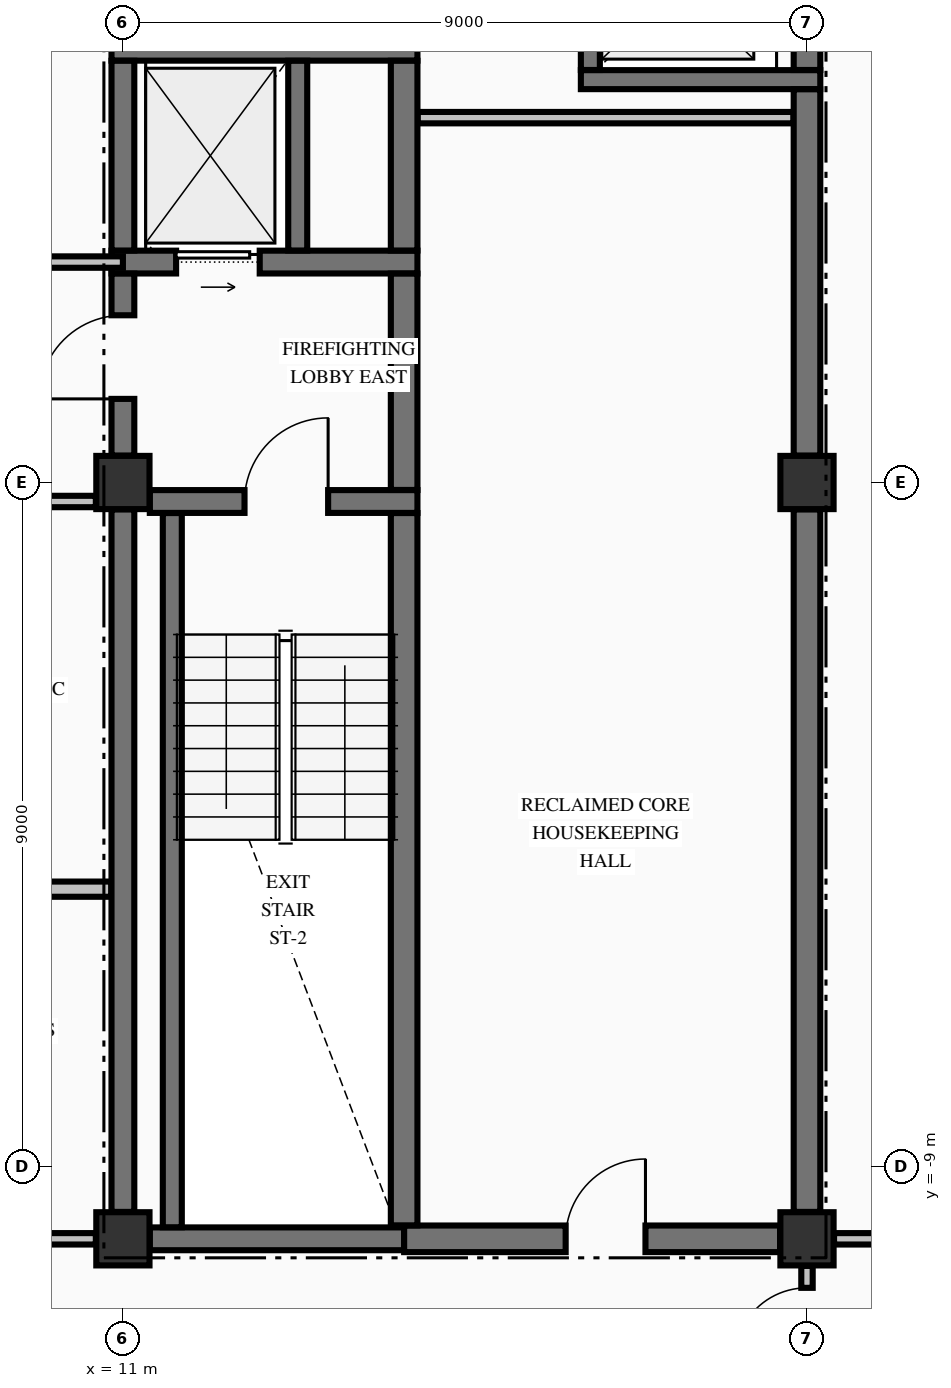
"""IFC4 building model, lengths in metres.
Left out: names, types, materials, properties, quantities, classifications, styles, units other than length and angle.
Written with IfcOpenShell. Run it as: python <this file> out.ifc"""

import sys

from ifc_helpers import new_model, si_unit, direction, frame, frame_2d, origin, origin_2d, place, context, subcontext, project, spatial, rectangle, extrude, element, fill, save


model = new_model("IFC4")
c1 = context("Model", 3, precision=1e-05, world=origin(), true_north=direction((0.0, 1.0)))
c2 = subcontext(c1, "Body", "Model", "MODEL_VIEW")
j1 = project(units=[si_unit("LENGTHUNIT", "METRE"), si_unit("PLANEANGLEUNIT", "RADIAN")], contexts=[c1])
p1 = place(None, origin())
s1 = spatial("IfcSite", under=j1, at=p1, CompositionType="ELEMENT")
p2 = place(p1, origin())
s2 = spatial("IfcBuilding", under=s1, at=p2, CompositionType="ELEMENT")
p3 = place(p2, frame((0.0, 0.0, 236.51)))
s3 = spatial("IfcBuildingStorey", under=s2, at=p3, CompositionType="ELEMENT", Elevation=236.51)
for number, where, z_axis, x_axis in (
    (1, (11.0, -9.95, -0.25), (0.0, 0.0, 1.0), (1.0, 0.0, 0.0)),
    (2, (11.0, 0.0, -0.25), (0.0, 0.0, 1.0), (1.0, 0.0, 0.0)),
    (3, (20.0, -9.95, -0.25), (0.0, 0.0, 1.0), (1.0, 0.0, 0.0)),
    (4, (20.0, 0.0, -0.25), (0.0, 0.0, 1.0), (1.0, 0.0, 0.0)),
):
    element("IfcColumn", number, at=place(p3, frame(where, z_axis=z_axis, x_axis=x_axis)), inside=s3, PredefinedType="COLUMN", context=c2, shape_type="SweptSolid", body=[
        extrude(rectangle(XDim=0.7, YDim=0.7, at=origin_2d()), origin(), (0.0, 0.0, 1.0), 3.23),
    ])
p4 = place(p3, frame((11.354, -9.95, 0.0), z_axis=(0.0, 0.0, 1.0), x_axis=(1.0, 0.0, 0.0)))
e5 = element("IfcWall", 5, at=p4, inside=s3, PredefinedType="SHEAR", context=c2, shape_type="SweptSolid", body=[
    extrude(rectangle(XDim=3.346, YDim=0.3, at=frame_2d((1.673, 0.0))), origin(), (0.0, 0.0, 1.0), 2.98),
])
p5 = place(p3, frame((14.7, -9.95, 0.0), z_axis=(0.0, 0.0, 1.0), x_axis=(1.0, 0.0, 0.0)))
e6 = element("IfcWall", 6, at=p5, inside=s3, PredefinedType="SHEAR", context=c2, shape_type="SweptSolid", body=[
    extrude(rectangle(XDim=4.946, YDim=0.35, at=frame_2d((2.473, 0.0))), origin(), (0.0, 0.0, 1.0), 2.98),
])
p6 = place(p5, frame((2.125, 0.0, 0.0)))
e7 = element("IfcOpeningElement", 7, at=p6, cuts=e6, PredefinedType="OPENING", context=c2, shape_type="SweptSolid", body=[
    extrude(rectangle(XDim=1.05, YDim=2.15, at=frame_2d((0.525, 1.075))), frame((0.0, 0.185, 0.0), z_axis=(0.0, -1.0, 0.0), x_axis=(1.0, 0.0, 0.0)), (0.0, 0.0, 1.0), 0.37),
])
p7 = place(p3, frame((11.354, -0.25, 0.0), z_axis=(0.0, 0.0, 1.0), x_axis=(1.0, 0.0, 0.0)))
e8 = element("IfcWall", 8, at=p7, inside=s3, PredefinedType="SHEAR", context=c2, shape_type="SweptSolid", body=[
    extrude(rectangle(XDim=3.521, YDim=0.3, at=frame_2d((1.76, 0.0))), origin(), (0.0, 0.0, 1.0), 2.98),
])
p8 = place(p7, frame((1.246, 0.0, 0.0)))
e9 = element("IfcOpeningElement", 9, at=p8, cuts=e8, PredefinedType="OPENING", context=c2, shape_type="SweptSolid", body=[
    extrude(rectangle(XDim=1.1, YDim=2.15, at=frame_2d((0.55, 1.075))), frame((0.0, 0.16, 0.0), z_axis=(0.0, -1.0, 0.0), x_axis=(1.0, 0.0, 0.0)), (0.0, 0.0, 1.0), 0.32),
])
p9 = place(p3, frame((10.85, 2.9, 0.0), z_axis=(0.0, 0.0, 1.0), x_axis=(1.0, 0.0, 0.0)))
e10 = element("IfcWall", 10, at=p9, inside=s3, PredefinedType="SHEAR", context=c2, shape_type="SweptSolid", body=[
    extrude(rectangle(XDim=4.025, YDim=0.3, at=frame_2d((2.012, 0.0))), origin(), (0.0, 0.0, 1.0), 2.98),
])
p10 = place(p9, frame((0.85, 0.0, 0.0)))
e11 = element("IfcOpeningElement", 11, at=p10, cuts=e10, PredefinedType="OPENING", context=c2, shape_type="SweptSolid", body=[
    extrude(rectangle(XDim=1.1, YDim=2.2, at=frame_2d((0.55, 1.1))), frame((0.0, 0.16, 0.0), z_axis=(0.0, -1.0, 0.0), x_axis=(1.0, 0.0, 0.0)), (0.0, 0.0, 1.0), 0.32),
])
p11 = place(p3, frame((17.025, 5.3, 0.0), z_axis=(0.0, 0.0, 1.0), x_axis=(1.0, 0.0, 0.0)))
e12 = element("IfcWall", 12, at=p11, inside=s3, PredefinedType="SOLIDWALL", context=c2, shape_type="SweptSolid", body=[
    extrude(rectangle(XDim=3.15, YDim=0.25, at=frame_2d((1.575, 0.0))), origin(), (0.0, 0.0, 1.0), 2.98),
])
p12 = place(p3, frame((10.85, 5.7, 0.0), z_axis=(0.0, 0.0, 1.0), x_axis=(1.0, 0.0, 0.0)))
e13 = element("IfcWall", 13, at=p12, inside=s3, PredefinedType="SHEAR", context=c2, shape_type="SweptSolid", body=[
    extrude(rectangle(XDim=4.025, YDim=0.3, at=frame_2d((2.012, 0.0))), origin(), (0.0, 0.0, 1.0), 2.98),
])
p13 = place(p3, frame((-10.644, -9.95, 0.0), z_axis=(0.0, 0.0, 1.0), x_axis=(1.0, 0.0, 0.0)))
e14 = element("IfcWall", 14, at=p13, inside=s3, PredefinedType="PARTITIONING", context=c2, shape_type="SweptSolid", body=[
    extrude(rectangle(XDim=21.288, YDim=0.15, at=frame_2d((10.644, 0.0))), origin(), (0.0, 0.0, 1.0), 2.98),
])
p14 = place(p13, frame((6.394, 0.0, 0.0)))
e15 = element("IfcOpeningElement", 15, at=p14, cuts=e14, PredefinedType="OPENING", context=c2, shape_type="SweptSolid", body=[
    extrude(rectangle(XDim=1.1, YDim=2.15, at=frame_2d((0.55, 1.075))), frame((0.0, 0.085, 0.0), z_axis=(0.0, -1.0, 0.0), x_axis=(1.0, 0.0, 0.0)), (0.0, 0.0, 1.0), 0.17),
])
p15 = place(p13, frame((13.769, 0.0, 0.0)))
e16 = element("IfcOpeningElement", 16, at=p15, cuts=e14, PredefinedType="OPENING", context=c2, shape_type="SweptSolid", body=[
    extrude(rectangle(XDim=0.95, YDim=2.15, at=frame_2d((0.475, 1.075))), frame((0.0, 0.085, 0.0), z_axis=(0.0, -1.0, 0.0), x_axis=(1.0, 0.0, 0.0)), (0.0, 0.0, 1.0), 0.17),
])
p16 = place(p13, frame((17.994, 0.0, 0.0)))
e17 = element("IfcOpeningElement", 17, at=p16, cuts=e14, PredefinedType="OPENING", context=c2, shape_type="SweptSolid", body=[
    extrude(rectangle(XDim=0.9, YDim=2.15, at=frame_2d((0.45, 1.075))), frame((0.0, 0.085, 0.0), z_axis=(0.0, -1.0, 0.0), x_axis=(1.0, 0.0, 0.0)), (0.0, 0.0, 1.0), 0.17),
])
p17 = place(p3, frame((20.356, -9.95, 0.0), z_axis=(0.0, 0.0, 1.0), x_axis=(1.0, 0.0, 0.0)))
e18 = element("IfcWall", 18, at=p17, inside=s3, PredefinedType="PARTITIONING", context=c2, shape_type="SweptSolid", body=[
    extrude(rectangle(XDim=5.479, YDim=0.15, at=frame_2d((2.74, 0.0))), origin(), (0.0, 0.0, 1.0), 2.98),
])
p18 = place(p17, frame((2.144, 0.0, 0.0)))
e19 = element("IfcOpeningElement", 19, at=p18, cuts=e18, PredefinedType="OPENING", context=c2, shape_type="SweptSolid", body=[
    extrude(rectangle(XDim=1.0, YDim=2.15, at=frame_2d((0.5, 1.075))), frame((0.0, 0.085, 0.0), z_axis=(0.0, -1.0, 0.0), x_axis=(1.0, 0.0, 0.0)), (0.0, 0.0, 1.0), 0.17),
])
p19 = place(p3, frame((-2.675, -5.35, 0.0), z_axis=(0.0, 0.0, 1.0), x_axis=(1.0, 0.0, 0.0)))
e20 = element("IfcWall", 20, at=p19, inside=s3, PredefinedType="PARTITIONING", context=c2, shape_type="SweptSolid", body=[
    extrude(rectangle(XDim=13.522, YDim=0.2, at=frame_2d((6.761, 0.0))), origin(), (0.0, 0.0, 1.0), 2.98),
])
p20 = place(p3, frame((-10.644, -0.25, 0.0), z_axis=(0.0, 0.0, 1.0), x_axis=(1.0, 0.0, 0.0)))
e21 = element("IfcWall", 21, at=p20, inside=s3, PredefinedType="PARTITIONING", context=c2, shape_type="SweptSolid", body=[
    extrude(rectangle(XDim=21.288, YDim=0.15, at=frame_2d((10.644, 0.0))), origin(), (0.0, 0.0, 1.0), 2.98),
])
p21 = place(p20, frame((6.394, 0.0, 0.0)))
e22 = element("IfcOpeningElement", 22, at=p21, cuts=e21, PredefinedType="OPENING", context=c2, shape_type="SweptSolid", body=[
    extrude(rectangle(XDim=1.1, YDim=2.15, at=frame_2d((0.55, 1.075))), frame((0.0, 0.085, 0.0), z_axis=(0.0, -1.0, 0.0), x_axis=(1.0, 0.0, 0.0)), (0.0, 0.0, 1.0), 0.17),
])
p22 = place(p20, frame((2.219, 0.0, 0.0)))
e23 = element("IfcOpeningElement", 23, at=p22, cuts=e21, PredefinedType="OPENING", context=c2, shape_type="SweptSolid", body=[
    extrude(rectangle(XDim=1.05, YDim=2.15, at=frame_2d((0.525, 1.075))), frame((0.0, 0.085, 0.0), z_axis=(0.0, -1.0, 0.0), x_axis=(1.0, 0.0, 0.0)), (0.0, 0.0, 1.0), 0.17),
])
p23 = place(p20, frame((14.369, 0.0, 0.0)))
e24 = element("IfcOpeningElement", 24, at=p23, cuts=e21, PredefinedType="OPENING", context=c2, shape_type="SweptSolid", body=[
    extrude(rectangle(XDim=0.95, YDim=2.15, at=frame_2d((0.475, 1.075))), frame((0.0, 0.085, 0.0), z_axis=(0.0, -1.0, 0.0), x_axis=(1.0, 0.0, 0.0)), (0.0, 0.0, 1.0), 0.17),
])
p24 = place(p3, frame((-11.0, 2.9, 0.0), z_axis=(0.0, 0.0, 1.0), x_axis=(1.0, 0.0, 0.0)))
e25 = element("IfcWall", 25, at=p24, inside=s3, PredefinedType="PARTITIONING", context=c2, shape_type="SweptSolid", body=[
    extrude(rectangle(XDim=22.0, YDim=0.15, at=frame_2d((11.0, 0.0))), origin(), (0.0, 0.0, 1.0), 2.98),
])
p25 = place(p24, frame((6.75, 0.0, 0.0)))
e26 = element("IfcOpeningElement", 26, at=p25, cuts=e25, PredefinedType="OPENING", context=c2, shape_type="SweptSolid", body=[
    extrude(rectangle(XDim=1.1, YDim=2.15, at=frame_2d((0.55, 1.075))), frame((0.0, 0.085, 0.0), z_axis=(0.0, -1.0, 0.0), x_axis=(1.0, 0.0, 0.0)), (0.0, 0.0, 1.0), 0.17),
])
p26 = place(p24, frame((2.575, 0.0, 0.0)))
e27 = element("IfcOpeningElement", 27, at=p26, cuts=e25, PredefinedType="OPENING", context=c2, shape_type="SweptSolid", body=[
    extrude(rectangle(XDim=1.05, YDim=2.15, at=frame_2d((0.525, 1.075))), frame((0.0, 0.085, 0.0), z_axis=(0.0, -1.0, 0.0), x_axis=(1.0, 0.0, 0.0)), (0.0, 0.0, 1.0), 0.17),
])
p27 = place(p24, frame((14.65, 0.0, 0.0)))
e28 = element("IfcOpeningElement", 28, at=p27, cuts=e25, PredefinedType="OPENING", context=c2, shape_type="SweptSolid", body=[
    extrude(rectangle(XDim=1.1, YDim=2.15, at=frame_2d((0.55, 1.075))), frame((0.0, 0.085, 0.0), z_axis=(0.0, -1.0, 0.0), x_axis=(1.0, 0.0, 0.0)), (0.0, 0.0, 1.0), 0.17),
])
p28 = place(p3, frame((14.878, 4.8, 0.0), z_axis=(0.0, 0.0, 1.0), x_axis=(1.0, 0.0, 0.0)))
e29 = element("IfcWall", 29, at=p28, inside=s3, PredefinedType="PARTITIONING", context=c2, shape_type="SweptSolid", body=[
    extrude(rectangle(XDim=4.944, YDim=0.15, at=frame_2d((2.472, 0.0))), origin(), (0.0, 0.0, 1.0), 2.98),
])
p29 = place(p3, frame((11.0, -9.596, 0.0), z_axis=(0.0, 0.0, 1.0), x_axis=(0.0, 1.0, 0.0)))
e30 = element("IfcWall", 30, at=p29, inside=s3, PredefinedType="SHEAR", context=c2, shape_type="SweptSolid", body=[
    extrude(rectangle(XDim=9.242, YDim=0.3, at=frame_2d((4.621, 0.0))), origin(), (0.0, 0.0, 1.0), 2.98),
])
p30 = place(p3, frame((11.0, 0.354, 0.0), z_axis=(0.0, 0.0, 1.0), x_axis=(0.0, 1.0, 0.0)))
e31 = element("IfcWall", 31, at=p30, inside=s3, PredefinedType="SHEAR", context=c2, shape_type="SweptSolid", body=[
    extrude(rectangle(XDim=2.394, YDim=0.3, at=frame_2d((1.197, 0.0))), origin(), (0.0, 0.0, 1.0), 2.98),
])
p31 = place(p30, frame((0.746, 0.0, 0.0)))
e32 = element("IfcOpeningElement", 32, at=p31, cuts=e31, PredefinedType="OPENING", context=c2, shape_type="SweptSolid", body=[
    extrude(rectangle(XDim=1.1, YDim=2.15, at=frame_2d((0.55, 1.075))), frame((0.0, 0.16, 0.0), z_axis=(0.0, -1.0, 0.0), x_axis=(1.0, 0.0, 0.0)), (0.0, 0.0, 1.0), 0.32),
])
p32 = place(p3, frame((11.0, 3.052, 0.0), z_axis=(0.0, 0.0, 1.0), x_axis=(0.0, 1.0, 0.0)))
e33 = element("IfcWall", 33, at=p32, inside=s3, PredefinedType="SHEAR", context=c2, shape_type="SweptSolid", body=[
    extrude(rectangle(XDim=2.496, YDim=0.3, at=frame_2d((1.248, 0.0))), origin(), (0.0, 0.0, 1.0), 2.98),
])
p33 = place(p3, frame((11.65, -9.798, 0.0), z_axis=(0.0, 0.0, 1.0), x_axis=(0.0, 1.0, 0.0)))
e34 = element("IfcWall", 34, at=p33, inside=s3, PredefinedType="SOLIDWALL", context=c2, shape_type="SweptSolid", body=[
    extrude(rectangle(XDim=9.396, YDim=0.25, at=frame_2d((4.698, 0.0))), origin(), (0.0, 0.0, 1.0), 2.98),
])
p34 = place(p3, frame((13.3, 3.052, 0.0), z_axis=(0.0, 0.0, 1.0), x_axis=(0.0, 1.0, 0.0)))
e35 = element("IfcWall", 35, at=p34, inside=s3, PredefinedType="SOLIDWALL", context=c2, shape_type="SweptSolid", body=[
    extrude(rectangle(XDim=2.496, YDim=0.25, at=frame_2d((1.248, 0.0))), origin(), (0.0, 0.0, 1.0), 2.98),
])
p35 = place(p3, frame((14.7, -9.773, 0.0), z_axis=(0.0, 0.0, 1.0), x_axis=(0.0, 1.0, 0.0)))
e36 = element("IfcWall", 36, at=p35, inside=s3, PredefinedType="SHEAR", context=c2, shape_type="SweptSolid", body=[
    extrude(rectangle(XDim=9.371, YDim=0.35, at=frame_2d((4.686, 0.0))), origin(), (0.0, 0.0, 1.0), 2.98),
])
p36 = place(p3, frame((14.7, -0.098, 0.0), z_axis=(0.0, 0.0, 1.0), x_axis=(0.0, 1.0, 0.0)))
e37 = element("IfcWall", 37, at=p36, inside=s3, PredefinedType="SHEAR", context=c2, shape_type="SweptSolid", body=[
    extrude(rectangle(XDim=2.846, YDim=0.35, at=frame_2d((1.423, 0.0))), origin(), (0.0, 0.0, 1.0), 2.98),
])
p37 = place(p3, frame((14.7, 3.052, 0.0), z_axis=(0.0, 0.0, 1.0), x_axis=(0.0, 1.0, 0.0)))
e38 = element("IfcWall", 38, at=p37, inside=s3, PredefinedType="SHEAR", context=c2, shape_type="SweptSolid", body=[
    extrude(rectangle(XDim=2.496, YDim=0.35, at=frame_2d((1.248, 0.0))), origin(), (0.0, 0.0, 1.0), 2.98),
])
p38 = place(p3, frame((17.15, 5.427, 0.0), z_axis=(0.0, 0.0, 1.0), x_axis=(0.0, 1.0, 0.0)))
e39 = element("IfcWall", 39, at=p38, inside=s3, PredefinedType="SOLIDWALL", context=c2, shape_type="SweptSolid", body=[
    extrude(rectangle(XDim=2.196, YDim=0.25, at=frame_2d((1.098, 0.0))), origin(), (0.0, 0.0, 1.0), 2.98),
])
p39 = place(p38, frame((0.548, 0.0, 0.0)))
e40 = element("IfcOpeningElement", 40, at=p39, cuts=e39, PredefinedType="OPENING", context=c2, shape_type="SweptSolid", body=[
    extrude(rectangle(XDim=1.1, YDim=2.2, at=frame_2d((0.55, 1.1))), frame((0.0, 0.135, 0.0), z_axis=(0.0, -1.0, 0.0), x_axis=(1.0, 0.0, 0.0)), (0.0, 0.0, 1.0), 0.27),
])
p40 = place(p3, frame((20.0, -9.596, 0.0), z_axis=(0.0, 0.0, 1.0), x_axis=(0.0, 1.0, 0.0)))
e41 = element("IfcWall", 41, at=p40, inside=s3, PredefinedType="SHEAR", context=c2, shape_type="SweptSolid", body=[
    extrude(rectangle(XDim=9.242, YDim=0.35, at=frame_2d((4.621, 0.0))), origin(), (0.0, 0.0, 1.0), 2.98),
])
p41 = place(p3, frame((20.0, 0.354, 0.0), z_axis=(0.0, 0.0, 1.0), x_axis=(0.0, 1.0, 0.0)))
e42 = element("IfcWall", 42, at=p41, inside=s3, PredefinedType="SHEAR", context=c2, shape_type="SweptSolid", body=[
    extrude(rectangle(XDim=4.819, YDim=0.35, at=frame_2d((2.41, 0.0))), origin(), (0.0, 0.0, 1.0), 2.98),
])
p42 = place(p3, frame((20.0, 5.427, 0.0), z_axis=(0.0, 0.0, 1.0), x_axis=(0.0, 1.0, 0.0)))
e43 = element("IfcWall", 43, at=p42, inside=s3, PredefinedType="SHEAR", context=c2, shape_type="SweptSolid", body=[
    extrude(rectangle(XDim=2.196, YDim=0.35, at=frame_2d((1.098, 0.0))), origin(), (0.0, 0.0, 1.0), 2.98),
])
p43 = place(p3, frame((20.0, -12.122, 0.0), z_axis=(0.0, 0.0, 1.0), x_axis=(0.0, 1.0, 0.0)))
e44 = element("IfcWall", 44, at=p43, inside=s3, PredefinedType="PARTITIONING", context=c2, shape_type="SweptSolid", body=[
    extrude(rectangle(XDim=1.816, YDim=0.15, at=frame_2d((0.908, 0.0))), origin(), (0.0, 0.0, 1.0), 2.98),
])
p44 = place(p43, frame((0.577, 0.0, 0.0)))
e45 = element("IfcOpeningElement", 45, at=p44, cuts=e44, PredefinedType="OPENING", context=c2, shape_type="SweptSolid", body=[
    extrude(rectangle(XDim=0.95, YDim=2.15, at=frame_2d((0.475, 1.075))), frame((0.0, 0.085, 0.0), z_axis=(0.0, -1.0, 0.0), x_axis=(1.0, 0.0, 0.0)), (0.0, 0.0, 1.0), 0.17),
])
p45 = place(p8, origin())
e46 = element("IfcDoor", 46, at=p45, inside=s3, OperationType="SINGLE_SWING_RIGHT", PredefinedType="DOOR", context=c2, shape_type="SweptSolid", body=[
    extrude(rectangle(XDim=1.1, YDim=2.15, at=frame_2d((0.55, 1.075))), frame((0.0, 0.025, 0.0), z_axis=(0.0, -1.0, 0.0), x_axis=(1.0, 0.0, 0.0)), (0.0, 0.0, 1.0), 0.05),
])
fill(e9, e46)
p46 = place(p31, origin())
e47 = element("IfcDoor", 47, at=p46, inside=s3, OperationType="SINGLE_SWING_LEFT", PredefinedType="DOOR", context=c2, shape_type="SweptSolid", body=[
    extrude(rectangle(XDim=1.1, YDim=2.15, at=frame_2d((0.55, 1.075))), frame((0.0, 0.025, 0.0), z_axis=(0.0, -1.0, 0.0), x_axis=(1.0, 0.0, 0.0)), (0.0, 0.0, 1.0), 0.05),
])
fill(e32, e47)
p47 = place(p10, origin())
e48 = element("IfcDoor", 48, at=p47, inside=s3, OperationType="SLIDING_TO_RIGHT", PredefinedType="DOOR", context=c2, shape_type="SweptSolid", body=[
    extrude(rectangle(XDim=1.1, YDim=2.2, at=frame_2d((0.55, 1.1))), frame((0.0, 0.025, 0.0), z_axis=(0.0, -1.0, 0.0), x_axis=(1.0, 0.0, 0.0)), (0.0, 0.0, 1.0), 0.05),
])
fill(e11, e48)
p48 = place(p6, origin())
e49 = element("IfcDoor", 49, at=p48, inside=s3, OperationType="SINGLE_SWING_RIGHT", PredefinedType="DOOR", context=c2, shape_type="SweptSolid", body=[
    extrude(rectangle(XDim=1.05, YDim=2.15, at=frame_2d((0.525, 1.075))), frame((0.0, 0.025, 0.0), z_axis=(0.0, -1.0, 0.0), x_axis=(1.0, 0.0, 0.0)), (0.0, 0.0, 1.0), 0.05),
])
fill(e7, e49)
p49 = place(p44, origin())
e50 = element("IfcDoor", 50, at=p49, inside=s3, OperationType="SINGLE_SWING_LEFT", PredefinedType="DOOR", context=c2, shape_type="SweptSolid", body=[
    extrude(rectangle(XDim=0.95, YDim=2.15, at=frame_2d((0.475, 1.075))), frame((0.0, 0.025, 0.0), z_axis=(0.0, -1.0, 0.0), x_axis=(1.0, 0.0, 0.0)), (0.0, 0.0, 1.0), 0.05),
])
fill(e45, e50)
save(model, sys.argv[1])
